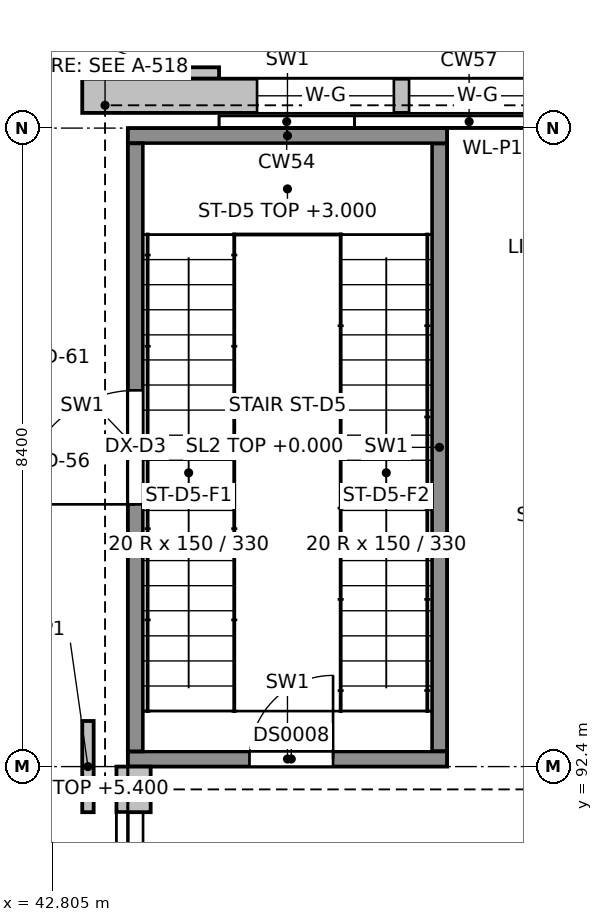
"""IFC4 building model, lengths in metres.
Left out: names, types, materials, properties, quantities, classifications, styles, units other than length and angle.
Written with IfcOpenShell. Run it as: python <this file> out.ifc"""

import sys

from ifc_helpers import new_model, si_unit, direction, frame, frame_2d, origin, place, context, subcontext, project, spatial, rectangle, extrude, element, fill, save


model = new_model("IFC4")
c1 = context("Model", 3, precision=1e-05, world=origin(), true_north=direction((0.0, 1.0)))
c2 = subcontext(c1, "Body", "Model", "MODEL_VIEW")
j1 = project(units=[si_unit("LENGTHUNIT", "METRE"), si_unit("PLANEANGLEUNIT", "RADIAN")], contexts=[c1])
p1 = place(None, origin())
s1 = spatial("IfcSite", under=j1, at=p1, CompositionType="ELEMENT")
p2 = place(p1, origin())
s2 = spatial("IfcBuilding", under=s1, at=p2, CompositionType="ELEMENT")
p3 = place(p2, origin())
s3 = spatial("IfcBuildingStorey", under=s2, at=p3, CompositionType="ELEMENT", Elevation=0.0)
p4 = place(p3, frame((43.8, 92.5, -1.35), z_axis=(0.0, 0.0, 1.0), x_axis=(1.0, 0.0, 0.0)))
e1 = element("IfcWall", 1, at=p4, inside=s3, PredefinedType="SHEAR", context=c2, shape_type="SweptSolid", body=[
    extrude(rectangle(XDim=4.2, YDim=0.2, at=frame_2d((2.1, 0.0))), origin(), (0.0, 0.0, 1.0), 7.35),
])
p5 = place(p4, frame((1.6, 0.0, 1.35)))
e2 = element("IfcOpeningElement", 2, at=p5, cuts=e1, PredefinedType="OPENING", context=c2, shape_type="SweptSolid", body=[
    extrude(rectangle(XDim=1.1, YDim=2.1, at=frame_2d((0.55, 1.05))), frame((0.0, 0.1, 0.0), z_axis=(0.0, -1.0, 0.0), x_axis=(1.0, 0.0, 0.0)), (0.0, 0.0, 1.0), 0.2),
])
p6 = place(p3, frame((43.8, 100.7, -1.35), z_axis=(0.0, 0.0, 1.0), x_axis=(1.0, 0.0, 0.0)))
e3 = element("IfcWall", 3, at=p6, inside=s3, PredefinedType="SHEAR", context=c2, shape_type="SweptSolid", body=[
    extrude(rectangle(XDim=4.2, YDim=0.2, at=frame_2d((2.1, 0.0))), origin(), (0.0, 0.0, 1.0), 7.35),
])
p7 = place(p3, frame((43.9, 92.6, -1.35), z_axis=(0.0, 0.0, 1.0), x_axis=(0.0, 1.0, 0.0)))
e4 = element("IfcWall", 4, at=p7, inside=s3, PredefinedType="SHEAR", context=c2, shape_type="SweptSolid", body=[
    extrude(rectangle(XDim=8.0, YDim=0.2, at=frame_2d((4.0, 0.0))), origin(), (0.0, 0.0, 1.0), 7.35),
])
p8 = place(p7, frame((3.25, 0.0, 1.35)))
e5 = element("IfcOpeningElement", 5, at=p8, cuts=e4, PredefinedType="OPENING", context=c2, shape_type="SweptSolid", body=[
    extrude(rectangle(XDim=1.5, YDim=2.4, at=frame_2d((0.75, 1.2))), frame((0.0, 0.1, 0.0), z_axis=(0.0, -1.0, 0.0), x_axis=(1.0, 0.0, 0.0)), (0.0, 0.0, 1.0), 0.2),
])
p9 = place(p3, frame((47.9, 92.6, -1.35), z_axis=(0.0, 0.0, 1.0), x_axis=(0.0, 1.0, 0.0)))
e6 = element("IfcWall", 6, at=p9, inside=s3, PredefinedType="SHEAR", context=c2, shape_type="SweptSolid", body=[
    extrude(rectangle(XDim=8.0, YDim=0.2, at=frame_2d((4.0, 0.0))), origin(), (0.0, 0.0, 1.0), 7.35),
])
p10 = place(p3, frame((43.825, 84.6, 0.0), z_axis=(0.0, 0.0, 1.0), x_axis=(0.0, 1.0, 0.0)))
e7 = element("IfcWall", 7, at=p10, inside=s3, PredefinedType="SOLIDWALL", context=c2, shape_type="SweptSolid", body=[
    extrude(rectangle(XDim=7.2, YDim=0.35, at=frame_2d((3.6, 0.0))), origin(), (0.0, 0.0, 1.0), 0.9),
])
p11 = place(p3, frame((43.875, 91.8, 0.0), z_axis=(0.0, 0.0, 1.0), x_axis=(0.0, 1.0, 0.0)))
e8 = element("IfcWall", 8, at=p11, inside=s3, PredefinedType="SOLIDWALL", context=c2, shape_type="SweptSolid", body=[
    extrude(rectangle(XDim=0.6, YDim=0.45, at=frame_2d((0.3, 0.0))), origin(), (0.0, 0.0, 1.0), 5.4),
])
p12 = place(p3, frame((43.275, 91.8, 0.0), z_axis=(0.0, 0.0, 1.0), x_axis=(0.0, 1.0, 0.0)))
e9 = element("IfcWall", 9, at=p12, inside=s3, PredefinedType="SOLIDWALL", context=c2, shape_type="SweptSolid", body=[
    extrude(rectangle(XDim=1.2, YDim=0.15, at=frame_2d((0.6, 0.0))), origin(), (0.0, 0.0, 1.0), 6.0),
])
p13 = place(p3, frame((43.2, 101.225, 0.0), z_axis=(0.0, 0.0, 1.0), x_axis=(1.0, 0.0, 0.0)))
e10 = element("IfcWall", 10, at=p13, inside=s3, PredefinedType="SOLIDWALL", context=c2, shape_type="SweptSolid", body=[
    extrude(rectangle(XDim=39.6, YDim=0.45, at=frame_2d((19.8, 0.0))), origin(), (0.0, 0.0, 1.0), 3.0),
])
p14 = place(p13, frame((2.3, 0.0, 0.9)))
e11 = element("IfcOpeningElement", 11, at=p14, cuts=e10, PredefinedType="OPENING", context=c2, shape_type="SweptSolid", body=[
    extrude(rectangle(XDim=1.8, YDim=1.8, at=frame_2d((0.9, 0.9))), frame((0.0, 0.225, 0.0), z_axis=(0.0, -1.0, 0.0), x_axis=(1.0, 0.0, 0.0)), (0.0, 0.0, 1.0), 0.45),
])
p15 = place(p13, frame((4.3, 0.0, 0.9)))
e12 = element("IfcOpeningElement", 12, at=p15, cuts=e10, PredefinedType="OPENING", context=c2, shape_type="SweptSolid", body=[
    extrude(rectangle(XDim=1.8, YDim=1.8, at=frame_2d((0.9, 0.9))), frame((0.0, 0.225, 0.0), z_axis=(0.0, -1.0, 0.0), x_axis=(1.0, 0.0, 0.0)), (0.0, 0.0, 1.0), 0.45),
])
p16 = place(p13, frame((10.2, 0.0, 0.0)))
e13 = element("IfcOpeningElement", 13, at=p16, cuts=e10, PredefinedType="OPENING", context=c2, shape_type="SweptSolid", body=[
    extrude(rectangle(XDim=2.4, YDim=2.4, at=frame_2d((1.2, 1.2))), frame((0.0, 0.225, 0.0), z_axis=(0.0, -1.0, 0.0), x_axis=(1.0, 0.0, 0.0)), (0.0, 0.0, 1.0), 0.45),
])
p17 = place(p13, frame((18.6, 0.0, 0.0)))
e14 = element("IfcOpeningElement", 14, at=p17, cuts=e10, PredefinedType="OPENING", context=c2, shape_type="SweptSolid", body=[
    extrude(rectangle(XDim=2.4, YDim=2.4, at=frame_2d((1.2, 1.2))), frame((0.0, 0.225, 0.0), z_axis=(0.0, -1.0, 0.0), x_axis=(1.0, 0.0, 0.0)), (0.0, 0.0, 1.0), 0.45),
])
p18 = place(p13, frame((33.5, 0.0, 0.9)))
e15 = element("IfcOpeningElement", 15, at=p18, cuts=e10, PredefinedType="OPENING", context=c2, shape_type="SweptSolid", body=[
    extrude(rectangle(XDim=1.8, YDim=1.8, at=frame_2d((0.9, 0.9))), frame((0.0, 0.225, 0.0), z_axis=(0.0, -1.0, 0.0), x_axis=(1.0, 0.0, 0.0)), (0.0, 0.0, 1.0), 0.45),
])
p19 = place(p13, frame((35.5, 0.0, 0.9)))
e16 = element("IfcOpeningElement", 16, at=p19, cuts=e10, PredefinedType="OPENING", context=c2, shape_type="SweptSolid", body=[
    extrude(rectangle(XDim=1.8, YDim=1.8, at=frame_2d((0.9, 0.9))), frame((0.0, 0.225, 0.0), z_axis=(0.0, -1.0, 0.0), x_axis=(1.0, 0.0, 0.0)), (0.0, 0.0, 1.0), 0.45),
])
p20 = place(p3, frame((43.8, 101.525, 0.0), z_axis=(0.0, 0.0, 1.0), x_axis=(1.0, 0.0, 0.0)))
e17 = element("IfcWall", 17, at=p20, inside=s3, PredefinedType="SOLIDWALL", context=c2, shape_type="SweptSolid", body=[
    extrude(rectangle(XDim=1.2, YDim=0.15, at=frame_2d((0.6, 0.0))), origin(), (0.0, 0.0, 1.0), 6.0),
])
p21 = place(p8, origin())
e18 = element("IfcDoor", 18, at=p21, inside=s3, OperationType="DOUBLE_DOOR_SINGLE_SWING", PredefinedType="DOOR", context=c2, shape_type="SweptSolid", body=[
    extrude(rectangle(XDim=1.5, YDim=2.4, at=frame_2d((0.75, 1.2))), frame((0.0, 0.025, 0.0), z_axis=(0.0, -1.0, 0.0), x_axis=(1.0, 0.0, 0.0)), (0.0, 0.0, 1.0), 0.05),
])
fill(e5, e18)
p22 = place(p14, origin())
e19 = element("IfcWindow", 19, at=p22, inside=s3, PartitioningType="SINGLE_PANEL", PredefinedType="WINDOW", context=c2, shape_type="SweptSolid", body=[
    extrude(rectangle(XDim=1.8, YDim=1.8, at=frame_2d((0.9, 0.9))), frame((0.0, 0.03, 0.0), z_axis=(0.0, -1.0, 0.0), x_axis=(1.0, 0.0, 0.0)), (0.0, 0.0, 1.0), 0.06),
])
fill(e11, e19)
p23 = place(p15, origin())
e20 = element("IfcWindow", 20, at=p23, inside=s3, PartitioningType="SINGLE_PANEL", PredefinedType="WINDOW", context=c2, shape_type="SweptSolid", body=[
    extrude(rectangle(XDim=1.8, YDim=1.8, at=frame_2d((0.9, 0.9))), frame((0.0, 0.03, 0.0), z_axis=(0.0, -1.0, 0.0), x_axis=(1.0, 0.0, 0.0)), (0.0, 0.0, 1.0), 0.06),
])
fill(e12, e20)
p24 = place(p5, frame((1.1, 0.05, 0.0), z_axis=(0.0, 0.0, 1.0), x_axis=(-1.0, 0.0, 0.0)))
e21 = element("IfcDoor", 21, at=p24, inside=s3, OperationType="SINGLE_SWING_RIGHT", PredefinedType="DOOR", context=c2, shape_type="SweptSolid", body=[
    extrude(rectangle(XDim=1.1, YDim=2.1, at=frame_2d((0.55, 1.05))), frame((0.0, 0.025, 0.0), z_axis=(0.0, -1.0, 0.0), x_axis=(1.0, 0.0, 0.0)), (0.0, 0.0, 1.0), 0.05),
])
fill(e2, e21)
save(model, sys.argv[1])
